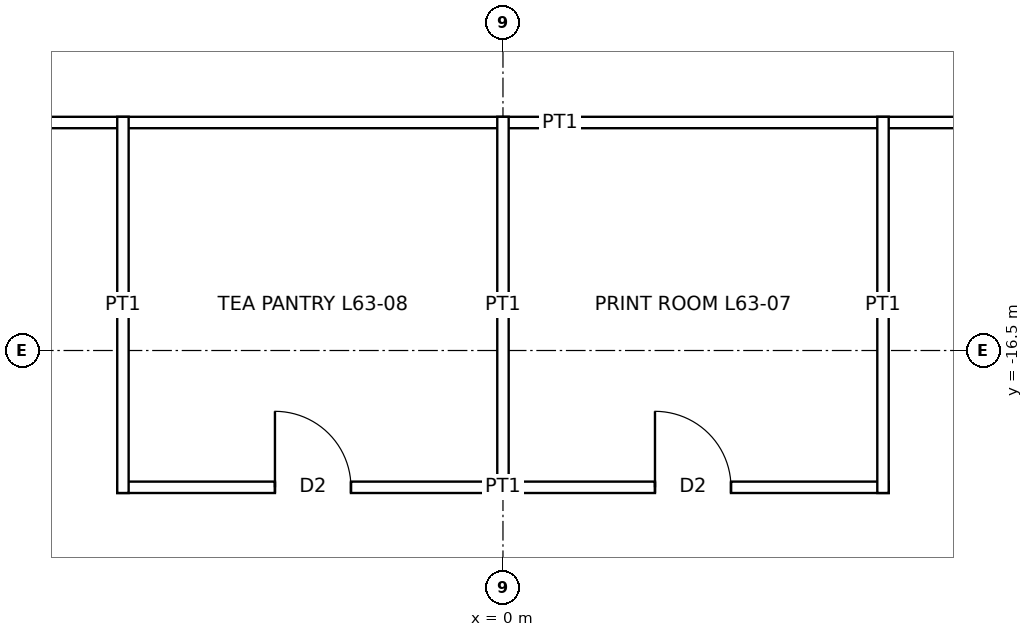
"""IFC4 building model, lengths in metres.
Left out: names, types, materials, properties, quantities, classifications, styles, units other than length and angle.
Written with IfcOpenShell. Run it as: python <this file> out.ifc"""

import sys

from ifc_helpers import new_model, si_unit, direction, frame, frame_2d, origin, place, context, subcontext, project, spatial, rectangle, extrude, element, fill, save


model = new_model("IFC4")
c1 = context("Model", 3, precision=1e-05, world=origin(), true_north=direction((0.0, 1.0)))
c2 = subcontext(c1, "Body", "Model", "MODEL_VIEW")
j1 = project(units=[si_unit("LENGTHUNIT", "METRE"), si_unit("PLANEANGLEUNIT", "RADIAN")], contexts=[c1])
p1 = place(None, origin())
s1 = spatial("IfcSite", under=j1, at=p1, CompositionType="ELEMENT")
p2 = place(p1, origin())
s2 = spatial("IfcBuilding", under=s1, at=p2, CompositionType="ELEMENT")
p3 = place(p2, frame((0.0, 0.0, 287.9)))
s3 = spatial("IfcBuildingStorey", under=s2, at=p3, CompositionType="ELEMENT", Elevation=287.9)
p4 = place(p3, frame((-5.075, -18.3, 0.0), z_axis=(0.0, 0.0, 1.0), x_axis=(1.0, 0.0, 0.0)))
e1 = element("IfcWall", 1, at=p4, inside=s3, PredefinedType="PARTITIONING", context=c2, shape_type="SweptSolid", body=[
    extrude(rectangle(XDim=10.15, YDim=0.15, at=frame_2d((5.075, 0.0))), origin(), (0.0, 0.0, 1.0), 3.85),
])
p5 = place(p4, frame((7.075, 0.0, 0.0)))
e2 = element("IfcOpeningElement", 2, at=p5, cuts=e1, PredefinedType="OPENING", context=c2, shape_type="SweptSolid", body=[
    extrude(rectangle(XDim=1.0, YDim=2.1, at=frame_2d((0.5, 1.05))), frame((0.0, 0.085, 0.0), z_axis=(0.0, -1.0, 0.0), x_axis=(1.0, 0.0, 0.0)), (0.0, 0.0, 1.0), 0.17),
])
p6 = place(p4, frame((2.075, 0.0, 0.0)))
e3 = element("IfcOpeningElement", 3, at=p6, cuts=e1, PredefinedType="OPENING", context=c2, shape_type="SweptSolid", body=[
    extrude(rectangle(XDim=1.0, YDim=2.1, at=frame_2d((0.5, 1.05))), frame((0.0, 0.085, 0.0), z_axis=(0.0, -1.0, 0.0), x_axis=(1.0, 0.0, 0.0)), (0.0, 0.0, 1.0), 0.17),
])
p7 = place(p3, frame((-12.075, -13.5, 0.0), z_axis=(0.0, 0.0, 1.0), x_axis=(1.0, 0.0, 0.0)))
e4 = element("IfcWall", 4, at=p7, inside=s3, PredefinedType="PARTITIONING", context=c2, shape_type="SweptSolid", body=[
    extrude(rectangle(XDim=25.65, YDim=0.15, at=frame_2d((12.825, 0.0))), origin(), (0.0, 0.0, 1.0), 3.85),
])
p8 = place(p7, frame((3.075, 0.0, 0.0)))
e5 = element("IfcOpeningElement", 5, at=p8, cuts=e4, PredefinedType="OPENING", context=c2, shape_type="SweptSolid", body=[
    extrude(rectangle(XDim=1.0, YDim=2.4, at=frame_2d((0.5, 1.2))), frame((0.0, 0.085, 0.0), z_axis=(0.0, -1.0, 0.0), x_axis=(1.0, 0.0, 0.0)), (0.0, 0.0, 1.0), 0.17),
])
p9 = place(p3, frame((-5.0, -18.375, 0.0), z_axis=(0.0, 0.0, 1.0), x_axis=(0.0, 1.0, 0.0)))
e6 = element("IfcWall", 6, at=p9, inside=s3, PredefinedType="PARTITIONING", context=c2, shape_type="SweptSolid", body=[
    extrude(rectangle(XDim=4.95, YDim=0.15, at=frame_2d((2.475, 0.0))), origin(), (0.0, 0.0, 1.0), 3.85),
])
p10 = place(p3, frame((0.0, -18.375, 0.0), z_axis=(0.0, 0.0, 1.0), x_axis=(0.0, 1.0, 0.0)))
e7 = element("IfcWall", 7, at=p10, inside=s3, PredefinedType="PARTITIONING", context=c2, shape_type="SweptSolid", body=[
    extrude(rectangle(XDim=4.95, YDim=0.15, at=frame_2d((2.475, 0.0))), origin(), (0.0, 0.0, 1.0), 3.243),
])
p11 = place(p3, frame((5.0, -18.375, 0.0), z_axis=(0.0, 0.0, 1.0), x_axis=(0.0, 1.0, 0.0)))
e8 = element("IfcWall", 8, at=p11, inside=s3, PredefinedType="PARTITIONING", context=c2, shape_type="SweptSolid", body=[
    extrude(rectangle(XDim=4.95, YDim=0.15, at=frame_2d((2.475, 0.0))), origin(), (0.0, 0.0, 1.0), 3.85),
])
p12 = place(p5, origin())
e9 = element("IfcDoor", 9, at=p12, inside=s3, OperationType="SINGLE_SWING_LEFT", PredefinedType="DOOR", context=c2, shape_type="SweptSolid", body=[
    extrude(rectangle(XDim=1.0, YDim=2.1, at=frame_2d((0.5, 1.05))), frame((0.0, 0.025, 0.0), z_axis=(0.0, -1.0, 0.0), x_axis=(1.0, 0.0, 0.0)), (0.0, 0.0, 1.0), 0.05),
])
fill(e2, e9)
p13 = place(p6, origin())
e10 = element("IfcDoor", 10, at=p13, inside=s3, OperationType="SINGLE_SWING_LEFT", PredefinedType="DOOR", context=c2, shape_type="SweptSolid", body=[
    extrude(rectangle(XDim=1.0, YDim=2.1, at=frame_2d((0.5, 1.05))), frame((0.0, 0.025, 0.0), z_axis=(0.0, -1.0, 0.0), x_axis=(1.0, 0.0, 0.0)), (0.0, 0.0, 1.0), 0.05),
])
fill(e3, e10)
save(model, sys.argv[1])
